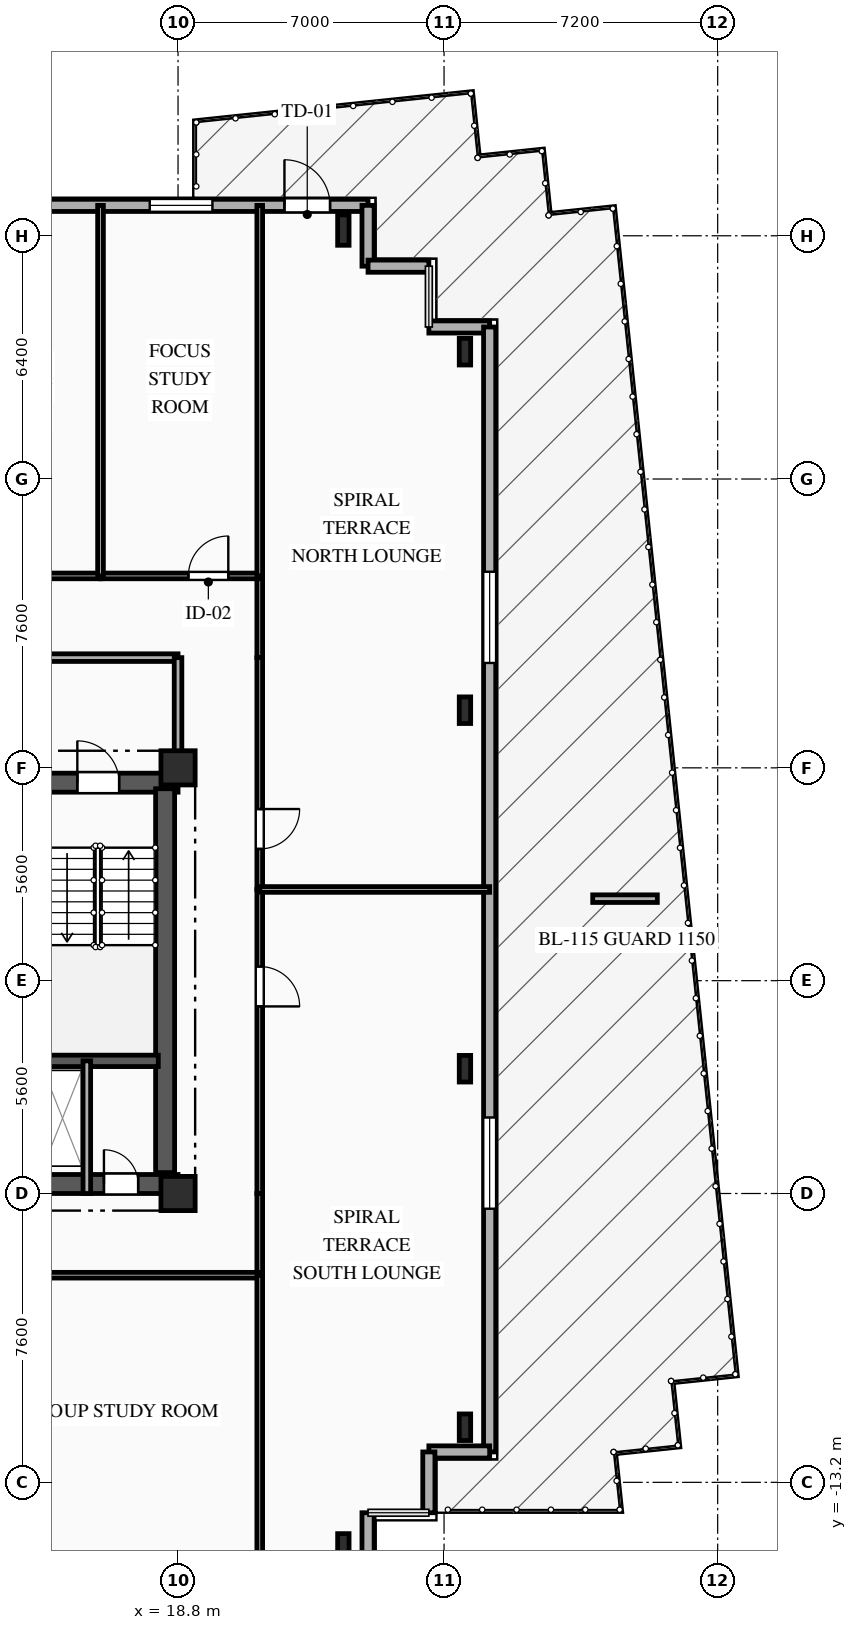
"""IFC4 building model, lengths in metres.
Left out: names, types, materials, properties, quantities, classifications, styles, units other than length and angle.
Written with IfcOpenShell. Run it as: python <this file> out.ifc"""

import sys

from ifc_helpers import new_model, si_unit, direction, frame, frame_2d, origin, origin_2d, place, context, subcontext, project, spatial, rectangle, i_section, extrude, element, fill, save


model = new_model("IFC4")
c1 = context("Model", 3, precision=1e-05, world=origin(), true_north=direction((0.0, 1.0)))
c2 = subcontext(c1, "Body", "Model", "MODEL_VIEW")
j1 = project(units=[si_unit("LENGTHUNIT", "METRE"), si_unit("PLANEANGLEUNIT", "RADIAN")], contexts=[c1])
p1 = place(None, origin())
s1 = spatial("IfcSite", under=j1, at=p1, CompositionType="ELEMENT")
p2 = place(p1, origin())
s2 = spatial("IfcBuilding", under=s1, at=p2, CompositionType="ELEMENT")
p3 = place(p2, frame((0.0, 0.0, 131.0)))
s3 = spatial("IfcBuildingStorey", under=s2, at=p3, CompositionType="ELEMENT", Elevation=131.0)
for number, where, z_axis, x_axis in (
    (1, (18.8, -5.6, 0.0), (0.0, 0.0, 1.0), (1.0, 0.0, 0.0)),
    (2, (18.8, 5.6, 0.0), (0.0, 0.0, 1.0), (1.0, 0.0, 0.0)),
):
    element("IfcColumn", number, at=place(p3, frame(where, z_axis=z_axis, x_axis=x_axis)), inside=s3, PredefinedType="COLUMN", context=c2, shape_type="SweptSolid", body=[
        extrude(rectangle(XDim=0.9, YDim=0.9, at=origin_2d()), origin(), (0.0, 0.0, 1.0), 3.35),
    ])
for number, where, z_axis, x_axis in (
    (3, (23.15, -14.95, 0.0), (0.0, 0.0, 1.0), (1.0, 0.0, 0.0)),
    (4, (23.15, 19.75, 0.0), (0.0, 0.0, 1.0), (1.0, 0.0, 0.0)),
):
    element("IfcColumn", number, at=place(p3, frame(where, z_axis=z_axis, x_axis=x_axis)), inside=s3, PredefinedType="COLUMN", context=c2, shape_type="SweptSolid", body=[
        extrude(i_section(OverallWidth=0.3, OverallDepth=0.8, WebThickness=0.018, FlangeThickness=0.033, FilletRadius=0.03, at=origin_2d()), origin(), (0.0, 0.0, 1.0), 3.35),
    ])
for number, where, z_axis, x_axis in (
    (5, (26.35, -11.75, 0.0), (0.0, 0.0, 1.0), (1.0, 0.0, 0.0)),
    (6, (26.35, -2.317, 0.0), (0.0, 0.0, 1.0), (1.0, 0.0, 0.0)),
    (7, (26.35, 7.117, 0.0), (0.0, 0.0, 1.0), (1.0, 0.0, 0.0)),
    (8, (26.35, 16.55, 0.0), (0.0, 0.0, 1.0), (1.0, 0.0, 0.0)),
):
    element("IfcColumn", number, at=place(p3, frame(where, z_axis=z_axis, x_axis=x_axis)), inside=s3, PredefinedType="COLUMN", context=c2, shape_type="SweptSolid", body=[
        extrude(i_section(OverallWidth=0.3, OverallDepth=0.7, WebThickness=0.017, FlangeThickness=0.032, FilletRadius=0.027, at=origin_2d()), origin(), (0.0, 0.0, 1.0), 3.35),
    ])
p4 = place(p3, frame((-25.8, 20.4, 0.0), z_axis=(0.0, 0.0, 1.0), x_axis=(1.0, 0.0, 0.0)))
e9 = element("IfcWall", 9, at=p4, inside=s3, PredefinedType="SOLIDWALL", context=c2, shape_type="SweptSolid", body=[
    extrude(rectangle(XDim=49.6, YDim=0.32, at=frame_2d((24.8, 0.0))), origin(), (0.0, 0.0, 1.0), 3.04),
])
p5 = place(p4, frame((47.4, 0.0, 0.0)))
e10 = element("IfcOpeningElement", 10, at=p5, cuts=e9, PredefinedType="OPENING", context=c2, shape_type="SweptSolid", body=[
    extrude(rectangle(XDim=1.2, YDim=2.2, at=frame_2d((0.6, 1.1))), frame((0.0, 0.17, 0.0), z_axis=(0.0, -1.0, 0.0), x_axis=(1.0, 0.0, 0.0)), (0.0, 0.0, 1.0), 0.34),
])
p6 = place(p4, frame((2.135, 0.0, 0.85)))
e11 = element("IfcOpeningElement", 11, at=p6, cuts=e9, PredefinedType="OPENING", context=c2, shape_type="SweptSolid", body=[
    extrude(rectangle(XDim=1.65, YDim=1.85, at=frame_2d((0.825, 0.925))), frame((0.0, 0.17, 0.0), z_axis=(0.0, -1.0, 0.0), x_axis=(1.0, 0.0, 0.0)), (0.0, 0.0, 1.0), 0.34),
])
p7 = place(p4, frame((6.135, 0.0, 0.85)))
e12 = element("IfcOpeningElement", 12, at=p7, cuts=e9, PredefinedType="OPENING", context=c2, shape_type="SweptSolid", body=[
    extrude(rectangle(XDim=1.65, YDim=1.85, at=frame_2d((0.825, 0.925))), frame((0.0, 0.17, 0.0), z_axis=(0.0, -1.0, 0.0), x_axis=(1.0, 0.0, 0.0)), (0.0, 0.0, 1.0), 0.34),
])
p8 = place(p4, frame((10.375, 0.0, 0.85)))
e13 = element("IfcOpeningElement", 13, at=p8, cuts=e9, PredefinedType="OPENING", context=c2, shape_type="SweptSolid", body=[
    extrude(rectangle(XDim=1.65, YDim=1.85, at=frame_2d((0.825, 0.925))), frame((0.0, 0.17, 0.0), z_axis=(0.0, -1.0, 0.0), x_axis=(1.0, 0.0, 0.0)), (0.0, 0.0, 1.0), 0.34),
])
p9 = place(p4, frame((17.89, 0.0, 0.85)))
e14 = element("IfcOpeningElement", 14, at=p9, cuts=e9, PredefinedType="OPENING", context=c2, shape_type="SweptSolid", body=[
    extrude(rectangle(XDim=1.5, YDim=1.85, at=frame_2d((0.75, 0.925))), frame((0.0, 0.17, 0.0), z_axis=(0.0, -1.0, 0.0), x_axis=(1.0, 0.0, 0.0)), (0.0, 0.0, 1.0), 0.34),
])
p10 = place(p4, frame((25.592, 0.0, 0.85)))
e15 = element("IfcOpeningElement", 15, at=p10, cuts=e9, PredefinedType="OPENING", context=c2, shape_type="SweptSolid", body=[
    extrude(rectangle(XDim=2.2, YDim=1.85, at=frame_2d((1.1, 0.925))), frame((0.0, 0.17, 0.0), z_axis=(0.0, -1.0, 0.0), x_axis=(1.0, 0.0, 0.0)), (0.0, 0.0, 1.0), 0.34),
])
p11 = place(p4, frame((33.1, 0.0, 0.85)))
e16 = element("IfcOpeningElement", 16, at=p11, cuts=e9, PredefinedType="OPENING", context=c2, shape_type="SweptSolid", body=[
    extrude(rectangle(XDim=2.2, YDim=1.85, at=frame_2d((1.1, 0.925))), frame((0.0, 0.17, 0.0), z_axis=(0.0, -1.0, 0.0), x_axis=(1.0, 0.0, 0.0)), (0.0, 0.0, 1.0), 0.34),
])
p12 = place(p4, frame((39.092, 0.0, 0.85)))
e17 = element("IfcOpeningElement", 17, at=p12, cuts=e9, PredefinedType="OPENING", context=c2, shape_type="SweptSolid", body=[
    extrude(rectangle(XDim=1.65, YDim=1.85, at=frame_2d((0.825, 0.925))), frame((0.0, 0.17, 0.0), z_axis=(0.0, -1.0, 0.0), x_axis=(1.0, 0.0, 0.0)), (0.0, 0.0, 1.0), 0.34),
])
p13 = place(p4, frame((43.855, 0.0, 0.85)))
e18 = element("IfcOpeningElement", 18, at=p13, cuts=e9, PredefinedType="OPENING", context=c2, shape_type="SweptSolid", body=[
    extrude(rectangle(XDim=1.65, YDim=1.85, at=frame_2d((0.825, 0.925))), frame((0.0, 0.17, 0.0), z_axis=(0.0, -1.0, 0.0), x_axis=(1.0, 0.0, 0.0)), (0.0, 0.0, 1.0), 0.34),
])
for number, where, z_axis, x_axis in (
    (19, (23.8, 20.4, 0.0), (0.0, 0.0, 1.0), (0.0, -1.0, 0.0)),
    (20, (23.8, 18.8, 0.0), (0.0, 0.0, 1.0), (1.0, 0.0, 0.0)),
):
    element("IfcWall", number, at=place(p3, frame(where, z_axis=z_axis, x_axis=x_axis)), inside=s3, PredefinedType="SOLIDWALL", context=c2, shape_type="SweptSolid", body=[
        extrude(rectangle(XDim=1.6, YDim=0.32, at=frame_2d((0.8, 0.0))), origin(), (0.0, 0.0, 1.0), 3.04),
    ])
p14 = place(p3, frame((25.4, 17.2, 0.0), z_axis=(0.0, 0.0, 1.0), x_axis=(1.0, 0.0, 0.0)))
e21 = element("IfcWall", 21, at=p14, inside=s3, PredefinedType="SOLIDWALL", context=c2, shape_type="SweptSolid", body=[
    extrude(rectangle(XDim=1.6, YDim=0.32, at=frame_2d((0.8, 0.0))), origin(), (0.0, 0.0, 1.0), 3.04),
])
p15 = place(p3, frame((27.0, 17.2, 0.0), z_axis=(0.0, 0.0, 1.0), x_axis=(0.0, -1.0, 0.0)))
e22 = element("IfcWall", 22, at=p15, inside=s3, PredefinedType="SOLIDWALL", context=c2, shape_type="SweptSolid", body=[
    extrude(rectangle(XDim=29.6, YDim=0.32, at=frame_2d((14.8, 0.0))), origin(), (0.0, 0.0, 1.0), 3.04),
])
p16 = place(p15, frame((6.44, 0.0, 0.85)))
e23 = element("IfcOpeningElement", 23, at=p16, cuts=e22, PredefinedType="OPENING", context=c2, shape_type="SweptSolid", body=[
    extrude(rectangle(XDim=2.4, YDim=1.95, at=frame_2d((1.2, 0.975))), frame((0.0, 0.17, 0.0), z_axis=(0.0, -1.0, 0.0), x_axis=(1.0, 0.0, 0.0)), (0.0, 0.0, 1.0), 0.34),
])
p17 = place(p15, frame((20.8, 0.0, 0.85)))
e24 = element("IfcOpeningElement", 24, at=p17, cuts=e22, PredefinedType="OPENING", context=c2, shape_type="SweptSolid", body=[
    extrude(rectangle(XDim=2.4, YDim=1.95, at=frame_2d((1.2, 0.975))), frame((0.0, 0.17, 0.0), z_axis=(0.0, -1.0, 0.0), x_axis=(1.0, 0.0, 0.0)), (0.0, 0.0, 1.0), 0.34),
])
for number, where, z_axis, x_axis in (
    (25, (27.0, -12.4, 0.0), (0.0, 0.0, 1.0), (-1.0, 0.0, 0.0)),
    (26, (25.4, -12.4, 0.0), (0.0, 0.0, 1.0), (0.0, -1.0, 0.0)),
    (27, (23.8, -14.0, 0.0), (0.0, 0.0, 1.0), (0.0, -1.0, 0.0)),
):
    element("IfcWall", number, at=place(p3, frame(where, z_axis=z_axis, x_axis=x_axis)), inside=s3, PredefinedType="SOLIDWALL", context=c2, shape_type="SweptSolid", body=[
        extrude(rectangle(XDim=1.6, YDim=0.32, at=frame_2d((0.8, 0.0))), origin(), (0.0, 0.0, 1.0), 3.04),
    ])
p18 = place(p3, frame((29.712, 2.158, 0.0), z_axis=(0.0, 0.0, 1.0), x_axis=(1.0, 0.0, 0.0)))
e28 = element("IfcWall", 28, at=p18, inside=s3, PredefinedType="USERDEFINED", context=c2, shape_type="SweptSolid", body=[
    extrude(rectangle(XDim=1.7, YDim=0.2, at=frame_2d((0.85, 0.0))), origin(), (0.0, 0.0, 1.0), 0.45),
])
p19 = place(p3, frame((9.2, 5.21, 0.0), z_axis=(0.0, 0.0, 1.0), x_axis=(1.0, 0.0, 0.0)))
e29 = element("IfcWall", 29, at=p19, inside=s3, PredefinedType="SHEAR", context=c2, shape_type="SweptSolid", body=[
    extrude(rectangle(XDim=9.6, YDim=0.5, at=frame_2d((4.8, 0.0))), origin(), (0.0, 0.0, 1.0), 3.04),
])
p20 = place(p19, frame((6.95, 0.0, 0.0)))
e30 = element("IfcOpeningElement", 30, at=p20, cuts=e29, PredefinedType="OPENING", context=c2, shape_type="SweptSolid", body=[
    extrude(rectangle(XDim=1.1, YDim=2.15, at=frame_2d((0.55, 1.075))), frame((0.0, 0.26, 0.0), z_axis=(0.0, -1.0, 0.0), x_axis=(1.0, 0.0, 0.0)), (0.0, 0.0, 1.0), 0.52),
])
p21 = place(p19, frame((3.775, 0.0, 0.0)))
e31 = element("IfcOpeningElement", 31, at=p21, cuts=e29, PredefinedType="OPENING", context=c2, shape_type="SweptSolid", body=[
    extrude(rectangle(XDim=1.05, YDim=2.1, at=frame_2d((0.525, 1.05))), frame((0.0, 0.26, 0.0), z_axis=(0.0, -1.0, 0.0), x_axis=(1.0, 0.0, 0.0)), (0.0, 0.0, 1.0), 0.52),
])
p22 = place(p3, frame((9.2, -5.35, 0.0), z_axis=(0.0, 0.0, 1.0), x_axis=(1.0, 0.0, 0.0)))
e32 = element("IfcWall", 32, at=p22, inside=s3, PredefinedType="SHEAR", context=c2, shape_type="SweptSolid", body=[
    extrude(rectangle(XDim=9.6, YDim=0.5, at=frame_2d((4.8, 0.0))), origin(), (0.0, 0.0, 1.0), 3.04),
])
p23 = place(p22, frame((7.65, 0.0, 0.0)))
e33 = element("IfcOpeningElement", 33, at=p23, cuts=e32, PredefinedType="OPENING", context=c2, shape_type="SweptSolid", body=[
    extrude(rectangle(XDim=0.9, YDim=2.1, at=frame_2d((0.45, 1.05))), frame((0.0, 0.26, 0.0), z_axis=(0.0, -1.0, 0.0), x_axis=(1.0, 0.0, 0.0)), (0.0, 0.0, 1.0), 0.52),
])
p24 = place(p3, frame((18.46, -5.05, 0.0), z_axis=(0.0, 0.0, 1.0), x_axis=(0.0, 1.0, 0.0)))
e34 = element("IfcWall", 34, at=p24, inside=s3, PredefinedType="SHEAR", context=c2, shape_type="SweptSolid", body=[
    extrude(rectangle(XDim=10.1, YDim=0.5, at=frame_2d((5.05, 0.0))), origin(), (0.0, 0.0, 1.0), 3.04),
])
p25 = place(p3, frame((15.1, -2.11, 0.0), z_axis=(0.0, 0.0, 1.0), x_axis=(1.0, 0.0, 0.0)))
e35 = element("IfcWall", 35, at=p25, inside=s3, PredefinedType="SHEAR", context=c2, shape_type="SweptSolid", body=[
    extrude(rectangle(XDim=3.18, YDim=0.3, at=frame_2d((1.59, 0.0))), origin(), (0.0, 0.0, 1.0), 3.04),
])
p26 = place(p3, frame((16.4, -2.11, 0.0), z_axis=(0.0, 0.0, 1.0), x_axis=(0.0, -1.0, 0.0)))
e36 = element("IfcWall", 36, at=p26, inside=s3, PredefinedType="PARTITIONING", context=c2, shape_type="SweptSolid", body=[
    extrude(rectangle(XDim=3.49, YDim=0.2, at=frame_2d((1.745, 0.0))), origin(), (0.0, 0.0, 1.0), 3.04),
])
p27 = place(p3, frame((18.8, 8.5, 0.0), z_axis=(0.0, 0.0, 1.0), x_axis=(-1.0, 0.0, 0.0)))
e37 = element("IfcWall", 37, at=p27, inside=s3, PredefinedType="PARTITIONING", context=c2, shape_type="SweptSolid", body=[
    extrude(rectangle(XDim=6.8, YDim=0.2, at=frame_2d((3.4, 0.0))), origin(), (0.0, 0.0, 1.0), 3.04),
])
p28 = place(p27, frame((3.985, 0.0, 0.0)))
e38 = element("IfcOpeningElement", 38, at=p28, cuts=e37, PredefinedType="OPENING", context=c2, shape_type="SweptSolid", body=[
    extrude(rectangle(XDim=1.1, YDim=2.15, at=frame_2d((0.55, 1.075))), frame((0.0, 0.11, 0.0), z_axis=(0.0, -1.0, 0.0), x_axis=(1.0, 0.0, 0.0)), (0.0, 0.0, 1.0), 0.22),
])
p29 = place(p3, frame((18.8, 5.6, 0.0), z_axis=(0.0, 0.0, 1.0), x_axis=(0.0, 1.0, 0.0)))
e39 = element("IfcWall", 39, at=p29, inside=s3, PredefinedType="PARTITIONING", context=c2, shape_type="SweptSolid", body=[
    extrude(rectangle(XDim=2.9, YDim=0.2, at=frame_2d((1.45, 0.0))), origin(), (0.0, 0.0, 1.0), 2.525),
])
p30 = place(p3, frame((20.95, 10.65, 0.0), z_axis=(0.0, 0.0, 1.0), x_axis=(0.0, -1.0, 0.0)))
e40 = element("IfcWall", 40, at=p30, inside=s3, PredefinedType="PARTITIONING", context=c2, shape_type="SweptSolid", body=[
    extrude(rectangle(XDim=2.15, YDim=0.15, at=frame_2d((1.075, 0.0))), origin(), (0.0, 0.0, 1.0), 3.04),
])
p31 = place(p3, frame((12.57, 10.65, 0.0), z_axis=(0.0, 0.0, 1.0), x_axis=(1.0, 0.0, 0.0)))
e41 = element("IfcWall", 41, at=p31, inside=s3, PredefinedType="PARTITIONING", context=c2, shape_type="SweptSolid", body=[
    extrude(rectangle(XDim=4.19, YDim=0.15, at=frame_2d((2.095, 0.0))), origin(), (0.0, 0.0, 1.0), 3.04),
])
p32 = place(p31, frame((0.827, 0.0, 0.0)))
e42 = element("IfcOpeningElement", 42, at=p32, cuts=e41, PredefinedType="OPENING", context=c2, shape_type="SweptSolid", body=[
    extrude(rectangle(XDim=1.05, YDim=2.15, at=frame_2d((0.525, 1.075))), frame((0.0, 0.085, 0.0), z_axis=(0.0, -1.0, 0.0), x_axis=(1.0, 0.0, 0.0)), (0.0, 0.0, 1.0), 0.17),
])
p33 = place(p3, frame((16.76, 10.65, 0.0), z_axis=(0.0, 0.0, 1.0), x_axis=(1.0, 0.0, 0.0)))
e43 = element("IfcWall", 43, at=p33, inside=s3, PredefinedType="PARTITIONING", context=c2, shape_type="SweptSolid", body=[
    extrude(rectangle(XDim=4.19, YDim=0.15, at=frame_2d((2.095, 0.0))), origin(), (0.0, 0.0, 1.0), 3.04),
])
p34 = place(p33, frame((2.312, 0.0, 0.0)))
e44 = element("IfcOpeningElement", 44, at=p34, cuts=e43, PredefinedType="OPENING", context=c2, shape_type="SweptSolid", body=[
    extrude(rectangle(XDim=1.05, YDim=2.15, at=frame_2d((0.525, 1.075))), frame((0.0, 0.085, 0.0), z_axis=(0.0, -1.0, 0.0), x_axis=(1.0, 0.0, 0.0)), (0.0, 0.0, 1.0), 0.17),
])
p35 = place(p3, frame((20.95, -5.6, 0.0), z_axis=(0.0, 0.0, 1.0), x_axis=(0.0, -1.0, 0.0)))
e45 = element("IfcWall", 45, at=p35, inside=s3, PredefinedType="PARTITIONING", context=c2, shape_type="SweptSolid", body=[
    extrude(rectangle(XDim=2.15, YDim=0.15, at=frame_2d((1.075, 0.0))), origin(), (0.0, 0.0, 1.0), 3.04),
])
p36 = place(p3, frame((20.95, -7.75, 0.0), z_axis=(0.0, 0.0, 1.0), x_axis=(-1.0, 0.0, 0.0)))
e46 = element("IfcWall", 46, at=p36, inside=s3, PredefinedType="PARTITIONING", context=c2, shape_type="SweptSolid", body=[
    extrude(rectangle(XDim=8.38, YDim=0.15, at=frame_2d((4.19, 0.0))), origin(), (0.0, 0.0, 1.0), 3.04),
])
p37 = place(p36, frame((5.979, 0.0, 0.0)))
e47 = element("IfcOpeningElement", 47, at=p37, cuts=e46, PredefinedType="OPENING", context=c2, shape_type="SweptSolid", body=[
    extrude(rectangle(XDim=1.05, YDim=2.15, at=frame_2d((0.525, 1.075))), frame((0.0, 0.085, 0.0), z_axis=(0.0, -1.0, 0.0), x_axis=(1.0, 0.0, 0.0)), (0.0, 0.0, 1.0), 0.17),
])
p38 = place(p3, frame((20.95, 2.4, 0.0), z_axis=(0.0, 0.0, 1.0), x_axis=(0.0, -1.0, 0.0)))
e48 = element("IfcWall", 48, at=p38, inside=s3, PredefinedType="PARTITIONING", context=c2, shape_type="SweptSolid", body=[
    extrude(rectangle(XDim=8.0, YDim=0.15, at=frame_2d((4.0, 0.0))), origin(), (0.0, 0.0, 1.0), 3.04),
])
p39 = place(p38, frame((2.028, 0.0, 0.0)))
e49 = element("IfcOpeningElement", 49, at=p39, cuts=e48, PredefinedType="OPENING", context=c2, shape_type="SweptSolid", body=[
    extrude(rectangle(XDim=1.05, YDim=2.15, at=frame_2d((0.525, 1.075))), frame((0.0, 0.085, 0.0), z_axis=(0.0, -1.0, 0.0), x_axis=(1.0, 0.0, 0.0)), (0.0, 0.0, 1.0), 0.17),
])
p40 = place(p3, frame((20.95, 8.5, 0.0), z_axis=(0.0, 0.0, 1.0), x_axis=(0.0, -1.0, 0.0)))
e50 = element("IfcWall", 50, at=p40, inside=s3, PredefinedType="PARTITIONING", context=c2, shape_type="SweptSolid", body=[
    extrude(rectangle(XDim=6.1, YDim=0.15, at=frame_2d((3.05, 0.0))), origin(), (0.0, 0.0, 1.0), 3.04),
])
p41 = place(p40, frame((3.984, 0.0, 0.0)))
e51 = element("IfcOpeningElement", 51, at=p41, cuts=e50, PredefinedType="OPENING", context=c2, shape_type="SweptSolid", body=[
    extrude(rectangle(XDim=1.05, YDim=2.15, at=frame_2d((0.525, 1.075))), frame((0.0, 0.085, 0.0), z_axis=(0.0, -1.0, 0.0), x_axis=(1.0, 0.0, 0.0)), (0.0, 0.0, 1.0), 0.17),
])
p42 = place(p3, frame((20.95, 2.4, 0.0), z_axis=(0.0, 0.0, 1.0), x_axis=(1.0, 0.0, 0.0)))
e52 = element("IfcWall", 52, at=p42, inside=s3, PredefinedType="PARTITIONING", context=c2, shape_type="SweptSolid", body=[
    extrude(rectangle(XDim=6.05, YDim=0.15, at=frame_2d((3.025, 0.0))), origin(), (0.0, 0.0, 1.0), 3.04),
])
p43 = place(p3, frame((20.95, -15.6, 0.0), z_axis=(0.0, 0.0, 1.0), x_axis=(0.0, 1.0, 0.0)))
e53 = element("IfcWall", 53, at=p43, inside=s3, PredefinedType="PARTITIONING", context=c2, shape_type="SweptSolid", body=[
    extrude(rectangle(XDim=7.85, YDim=0.15, at=frame_2d((3.925, 0.0))), origin(), (0.0, 0.0, 1.0), 3.04),
])
for number, where, z_axis, x_axis in (
    (54, (20.95, 10.65, 0.0), (0.0, 0.0, 1.0), (0.0, 1.0, 0.0)),
    (55, (16.76, 20.4, 0.0), (0.0, 0.0, 1.0), (0.0, -1.0, 0.0)),
):
    element("IfcWall", number, at=place(p3, frame(where, z_axis=z_axis, x_axis=x_axis)), inside=s3, PredefinedType="PARTITIONING", context=c2, shape_type="SweptSolid", body=[
        extrude(rectangle(XDim=9.75, YDim=0.15, at=frame_2d((4.875, 0.0))), origin(), (0.0, 0.0, 1.0), 2.525),
    ])
p44 = place(p5, origin())
e56 = element("IfcDoor", 56, at=p44, inside=s3, OperationType="SINGLE_SWING_LEFT", PredefinedType="DOOR", context=c2, shape_type="SweptSolid", body=[
    extrude(rectangle(XDim=1.2, YDim=2.2, at=frame_2d((0.6, 1.1))), frame((0.0, 0.025, 0.0), z_axis=(0.0, -1.0, 0.0), x_axis=(1.0, 0.0, 0.0)), (0.0, 0.0, 1.0), 0.05),
])
fill(e10, e56)
p45 = place(p13, origin())
e57 = element("IfcWindow", 57, at=p45, inside=s3, PartitioningType="SINGLE_PANEL", PredefinedType="WINDOW", context=c2, shape_type="SweptSolid", body=[
    extrude(rectangle(XDim=1.65, YDim=1.85, at=frame_2d((0.825, 0.925))), frame((0.0, 0.03, 0.0), z_axis=(0.0, -1.0, 0.0), x_axis=(1.0, 0.0, 0.0)), (0.0, 0.0, 1.0), 0.06),
])
fill(e18, e57)
p46 = place(p16, origin())
e58 = element("IfcWindow", 58, at=p46, inside=s3, PartitioningType="SINGLE_PANEL", PredefinedType="WINDOW", context=c2, shape_type="SweptSolid", body=[
    extrude(rectangle(XDim=2.4, YDim=1.95, at=frame_2d((1.2, 0.975))), frame((0.0, 0.03, 0.0), z_axis=(0.0, -1.0, 0.0), x_axis=(1.0, 0.0, 0.0)), (0.0, 0.0, 1.0), 0.06),
])
fill(e23, e58)
p47 = place(p17, origin())
e59 = element("IfcWindow", 59, at=p47, inside=s3, PartitioningType="SINGLE_PANEL", PredefinedType="WINDOW", context=c2, shape_type="SweptSolid", body=[
    extrude(rectangle(XDim=2.4, YDim=1.95, at=frame_2d((1.2, 0.975))), frame((0.0, 0.03, 0.0), z_axis=(0.0, -1.0, 0.0), x_axis=(1.0, 0.0, 0.0)), (0.0, 0.0, 1.0), 0.06),
])
fill(e24, e59)
p48 = place(p20, origin())
e60 = element("IfcDoor", 60, at=p48, inside=s3, OperationType="SINGLE_SWING_LEFT", PredefinedType="DOOR", context=c2, shape_type="SweptSolid", body=[
    extrude(rectangle(XDim=1.1, YDim=2.15, at=frame_2d((0.55, 1.075))), frame((0.0, 0.025, 0.0), z_axis=(0.0, -1.0, 0.0), x_axis=(1.0, 0.0, 0.0)), (0.0, 0.0, 1.0), 0.05),
])
fill(e30, e60)
p49 = place(p23, origin())
e61 = element("IfcDoor", 61, at=p49, inside=s3, OperationType="SINGLE_SWING_LEFT", PredefinedType="DOOR", context=c2, shape_type="SweptSolid", body=[
    extrude(rectangle(XDim=0.9, YDim=2.1, at=frame_2d((0.45, 1.05))), frame((0.0, 0.025, 0.0), z_axis=(0.0, -1.0, 0.0), x_axis=(1.0, 0.0, 0.0)), (0.0, 0.0, 1.0), 0.05),
])
fill(e33, e61)
p50 = place(p34, origin())
e62 = element("IfcDoor", 62, at=p50, inside=s3, OperationType="SINGLE_SWING_RIGHT", PredefinedType="DOOR", context=c2, shape_type="SweptSolid", body=[
    extrude(rectangle(XDim=1.05, YDim=2.15, at=frame_2d((0.525, 1.075))), frame((0.0, 0.025, 0.0), z_axis=(0.0, -1.0, 0.0), x_axis=(1.0, 0.0, 0.0)), (0.0, 0.0, 1.0), 0.05),
])
fill(e44, e62)
p51 = place(p39, origin())
e63 = element("IfcDoor", 63, at=p51, inside=s3, OperationType="SINGLE_SWING_RIGHT", PredefinedType="DOOR", context=c2, shape_type="SweptSolid", body=[
    extrude(rectangle(XDim=1.05, YDim=2.15, at=frame_2d((0.525, 1.075))), frame((0.0, 0.025, 0.0), z_axis=(0.0, -1.0, 0.0), x_axis=(1.0, 0.0, 0.0)), (0.0, 0.0, 1.0), 0.05),
])
fill(e49, e63)
p52 = place(p41, origin())
e64 = element("IfcDoor", 64, at=p52, inside=s3, OperationType="SINGLE_SWING_LEFT", PredefinedType="DOOR", context=c2, shape_type="SweptSolid", body=[
    extrude(rectangle(XDim=1.05, YDim=2.15, at=frame_2d((0.525, 1.075))), frame((0.0, 0.025, 0.0), z_axis=(0.0, -1.0, 0.0), x_axis=(1.0, 0.0, 0.0)), (0.0, 0.0, 1.0), 0.05),
])
fill(e51, e64)
save(model, sys.argv[1])
